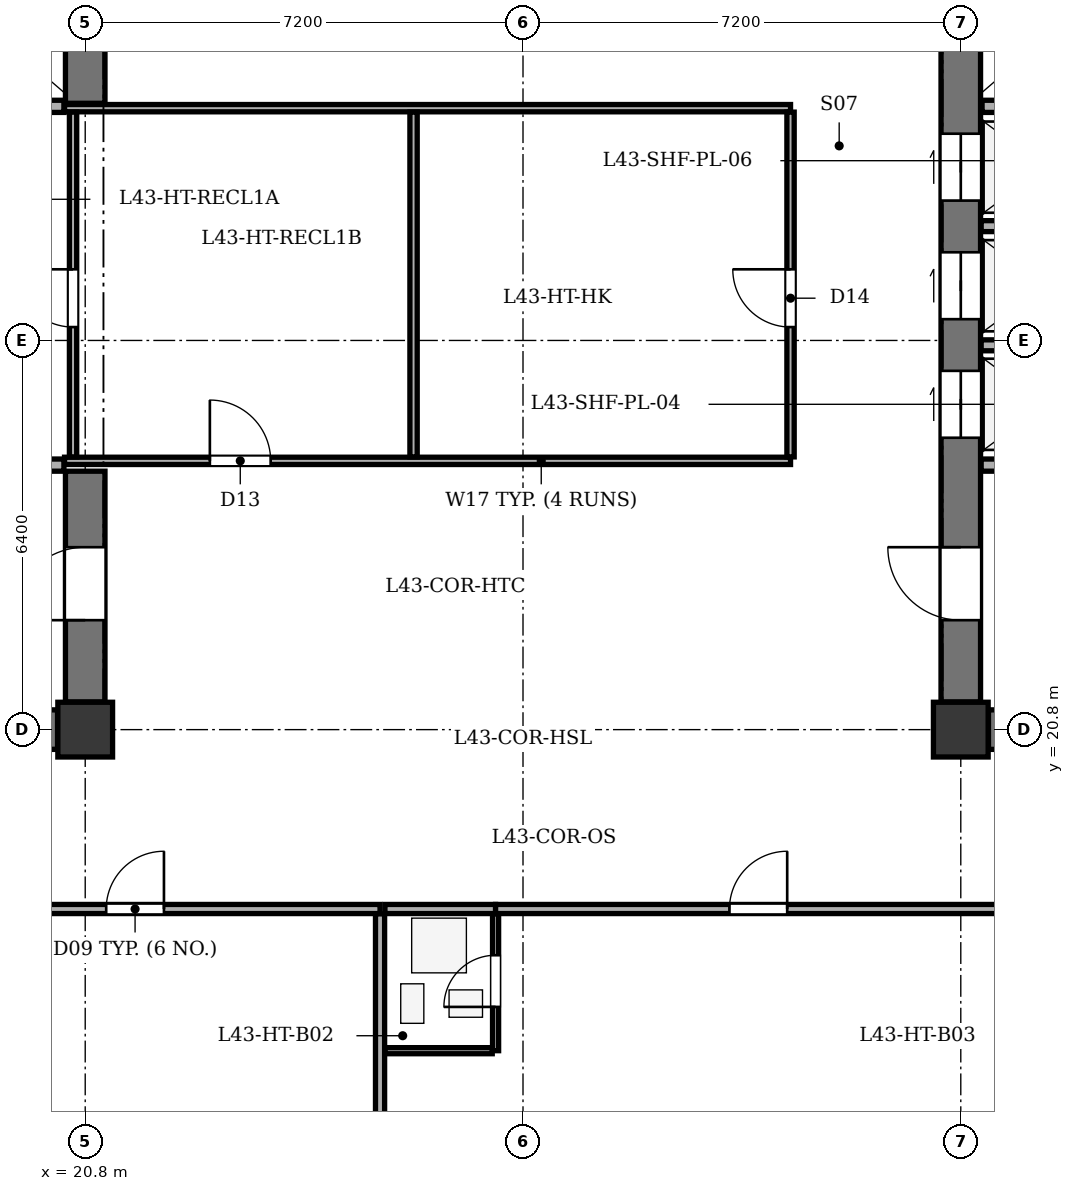
"""IFC4 building model, lengths in metres.
Left out: names, types, materials, properties, quantities, classifications, styles, units other than length and angle.
Written with IfcOpenShell. Run it as: python <this file> out.ifc"""

import sys

from ifc_helpers import new_model, si_unit, direction, frame, frame_2d, origin, origin_2d, place, context, subcontext, project, spatial, rectangle, extrude, element, fill, save


model = new_model("IFC4")
c1 = context("Model", 3, precision=1e-05, world=origin(), true_north=direction((0.0, 1.0)))
c2 = subcontext(c1, "Body", "Model", "MODEL_VIEW")
j1 = project(units=[si_unit("LENGTHUNIT", "METRE"), si_unit("PLANEANGLEUNIT", "RADIAN")], contexts=[c1])
p1 = place(None, origin())
s1 = spatial("IfcSite", under=j1, at=p1, CompositionType="ELEMENT")
p2 = place(p1, origin())
s2 = spatial("IfcBuilding", under=s1, at=p2, CompositionType="ELEMENT")
p3 = place(p2, frame((0.0, 0.0, 169.3)))
s3 = spatial("IfcBuildingStorey", under=s2, at=p3, CompositionType="ELEMENT", Elevation=169.3)
for number, where, z_axis, x_axis in (
    (1, (20.8, 20.8, 0.0), (0.0, 0.0, 1.0), (1.0, 0.0, 0.0)),
    (2, (35.2, 20.8, 0.0), (0.0, 0.0, 1.0), (1.0, 0.0, 0.0)),
):
    element("IfcColumn", number, at=place(p3, frame(where, z_axis=z_axis, x_axis=x_axis)), inside=s3, PredefinedType="COLUMN", context=c2, shape_type="SweptSolid", body=[
        extrude(rectangle(XDim=0.9, YDim=0.9, at=origin_2d()), origin(), (0.0, 0.0, 1.0), 3.5),
    ])
p4 = place(p3, frame((13.255, 20.8, 0.0), z_axis=(0.0, 0.0, 1.0), x_axis=(1.0, 0.0, 0.0)))
e3 = element("IfcWall", 3, at=p4, inside=s3, PredefinedType="SHEAR", context=c2, shape_type="SweptSolid", body=[
    extrude(rectangle(XDim=7.09, YDim=0.65, at=frame_2d((3.545, 0.0))), origin(), (0.0, 0.0, 1.0), 3.2),
])
p5 = place(p3, frame((20.8, 21.255, 0.0), z_axis=(0.0, 0.0, 1.0), x_axis=(0.0, 1.0, 0.0)))
e4 = element("IfcWall", 4, at=p5, inside=s3, PredefinedType="SHEAR", context=c2, shape_type="SweptSolid", body=[
    extrude(rectangle(XDim=3.795, YDim=0.65, at=frame_2d((1.897, 0.0))), origin(), (0.0, 0.0, 1.0), 3.2),
])
p6 = place(p5, frame((1.345, 0.0, 0.0)))
e5 = element("IfcOpeningElement", 5, at=p6, cuts=e4, PredefinedType="OPENING", context=c2, shape_type="SweptSolid", body=[
    extrude(rectangle(XDim=1.2, YDim=2.15, at=frame_2d((0.6, 1.075))), frame((0.0, 0.335, 0.0), z_axis=(0.0, -1.0, 0.0), x_axis=(1.0, 0.0, 0.0)), (0.0, 0.0, 1.0), 0.67),
])
p7 = place(p3, frame((20.8, 31.1, 0.0), z_axis=(0.0, 0.0, 1.0), x_axis=(0.0, 1.0, 0.0)))
e6 = element("IfcWall", 6, at=p7, inside=s3, PredefinedType="SHEAR", context=c2, shape_type="SweptSolid", body=[
    extrude(rectangle(XDim=2.045, YDim=0.65, at=frame_2d((1.022, 0.0))), origin(), (0.0, 0.0, 1.0), 3.2),
])
for number, where, z_axis, x_axis in (
    (7, (16.6, 25.15, 0.0), (0.0, 0.0, 1.0), (1.0, 0.0, 0.0)),
    (8, (16.6, 31.05, 0.0), (0.0, 0.0, 1.0), (1.0, 0.0, 0.0)),
):
    element("IfcWall", number, at=place(p3, frame(where, z_axis=z_axis, x_axis=x_axis)), inside=s3, PredefinedType="SOLIDWALL", context=c2, shape_type="SweptSolid", body=[
        extrude(rectangle(XDim=3.85, YDim=0.2, at=frame_2d((1.925, 0.0))), origin(), (0.0, 0.0, 1.0), 3.2),
    ])
p8 = place(p3, frame((35.655, 20.8, 0.0), z_axis=(0.0, 0.0, 1.0), x_axis=(1.0, 0.0, 0.0)))
e9 = element("IfcWall", 9, at=p8, inside=s3, PredefinedType="SHEAR", context=c2, shape_type="SweptSolid", body=[
    extrude(rectangle(XDim=7.09, YDim=0.65, at=frame_2d((3.545, 0.0))), origin(), (0.0, 0.0, 1.0), 3.2),
])
p9 = place(p3, frame((35.2, 21.255, 0.0), z_axis=(0.0, 0.0, 1.0), x_axis=(0.0, 1.0, 0.0)))
e10 = element("IfcWall", 10, at=p9, inside=s3, PredefinedType="SHEAR", context=c2, shape_type="SweptSolid", body=[
    extrude(rectangle(XDim=11.89, YDim=0.65, at=frame_2d((5.945, 0.0))), origin(), (0.0, 0.0, 1.0), 3.2),
])
p10 = place(p9, frame((1.345, 0.0, 0.0)))
e11 = element("IfcOpeningElement", 11, at=p10, cuts=e10, PredefinedType="OPENING", context=c2, shape_type="SweptSolid", body=[
    extrude(rectangle(XDim=1.2, YDim=2.15, at=frame_2d((0.6, 1.075))), frame((0.0, 0.335, 0.0), z_axis=(0.0, -1.0, 0.0), x_axis=(1.0, 0.0, 0.0)), (0.0, 0.0, 1.0), 0.67),
])
p11 = place(p9, frame((4.345, 0.0, 0.0)))
e12 = element("IfcOpeningElement", 12, at=p11, cuts=e10, PredefinedType="OPENING", context=c2, shape_type="SweptSolid", body=[
    extrude(rectangle(XDim=1.1, YDim=2.1, at=frame_2d((0.55, 1.05))), frame((0.0, 0.335, 0.0), z_axis=(0.0, -1.0, 0.0), x_axis=(1.0, 0.0, 0.0)), (0.0, 0.0, 1.0), 0.67),
])
p12 = place(p9, frame((6.295, 0.0, 0.0)))
e13 = element("IfcOpeningElement", 13, at=p12, cuts=e10, PredefinedType="OPENING", context=c2, shape_type="SweptSolid", body=[
    extrude(rectangle(XDim=1.1, YDim=2.1, at=frame_2d((0.55, 1.05))), frame((0.0, 0.335, 0.0), z_axis=(0.0, -1.0, 0.0), x_axis=(1.0, 0.0, 0.0)), (0.0, 0.0, 1.0), 0.67),
])
p13 = place(p9, frame((8.245, 0.0, 0.0)))
e14 = element("IfcOpeningElement", 14, at=p13, cuts=e10, PredefinedType="OPENING", context=c2, shape_type="SweptSolid", body=[
    extrude(rectangle(XDim=1.1, YDim=2.1, at=frame_2d((0.55, 1.05))), frame((0.0, 0.335, 0.0), z_axis=(0.0, -1.0, 0.0), x_axis=(1.0, 0.0, 0.0)), (0.0, 0.0, 1.0), 0.67),
])
p14 = place(p3, frame((35.535, 25.15, 0.0), z_axis=(0.0, 0.0, 1.0), x_axis=(1.0, 0.0, 0.0)))
e15 = element("IfcWall", 15, at=p14, inside=s3, PredefinedType="SOLIDWALL", context=c2, shape_type="SweptSolid", body=[
    extrude(rectangle(XDim=3.865, YDim=0.2, at=frame_2d((1.933, 0.0))), origin(), (0.0, 0.0, 1.0), 3.2),
])
p15 = place(p3, frame((35.55, 31.05, 0.0), z_axis=(0.0, 0.0, 1.0), x_axis=(1.0, 0.0, 0.0)))
e16 = element("IfcWall", 16, at=p15, inside=s3, PredefinedType="SOLIDWALL", context=c2, shape_type="SweptSolid", body=[
    extrude(rectangle(XDim=2.25, YDim=0.2, at=frame_2d((1.125, 0.0))), origin(), (0.0, 0.0, 1.0), 3.2),
])
for number, where, z_axis, x_axis in (
    (17, (35.535, 27.12, 0.0), (0.0, 0.0, 1.0), (1.0, 0.0, 0.0)),
    (18, (35.535, 29.08, 0.0), (0.0, 0.0, 1.0), (1.0, 0.0, 0.0)),
):
    element("IfcWall", number, at=place(p3, frame(where, z_axis=z_axis, x_axis=x_axis)), inside=s3, PredefinedType="PARTITIONING", context=c2, shape_type="SweptSolid", body=[
        extrude(rectangle(XDim=2.245, YDim=0.18, at=frame_2d((1.123, 0.0))), origin(), (0.0, 0.0, 1.0), 3.2),
    ])
p16 = place(p3, frame((20.46, 25.22, 0.0), z_axis=(0.0, 0.0, 1.0), x_axis=(1.0, 0.0, 0.0)))
e19 = element("IfcWall", 19, at=p16, inside=s3, PredefinedType="PARTITIONING", context=c2, shape_type="SweptSolid", body=[
    extrude(rectangle(XDim=11.94, YDim=0.12, at=frame_2d((5.97, 0.0))), origin(), (0.0, 0.0, 1.0), 3.2),
])
p17 = place(p16, frame((2.39, 0.0, 0.0)))
e20 = element("IfcOpeningElement", 20, at=p17, cuts=e19, PredefinedType="OPENING", context=c2, shape_type="SweptSolid", body=[
    extrude(rectangle(XDim=1.0, YDim=2.1, at=frame_2d((0.5, 1.05))), frame((0.0, 0.07, 0.0), z_axis=(0.0, -1.0, 0.0), x_axis=(1.0, 0.0, 0.0)), (0.0, 0.0, 1.0), 0.14),
])
p18 = place(p3, frame((20.46, 31.02, 0.0), z_axis=(0.0, 0.0, 1.0), x_axis=(1.0, 0.0, 0.0)))
e21 = element("IfcWall", 21, at=p18, inside=s3, PredefinedType="PARTITIONING", context=c2, shape_type="SweptSolid", body=[
    extrude(rectangle(XDim=11.94, YDim=0.12, at=frame_2d((5.97, 0.0))), origin(), (0.0, 0.0, 1.0), 3.2),
])
p19 = place(p3, frame((32.4, 25.285, 0.0), z_axis=(0.0, 0.0, 1.0), x_axis=(0.0, 1.0, 0.0)))
e22 = element("IfcWall", 22, at=p19, inside=s3, PredefinedType="PARTITIONING", context=c2, shape_type="SweptSolid", body=[
    extrude(rectangle(XDim=5.67, YDim=0.12, at=frame_2d((2.835, 0.0))), origin(), (0.0, 0.0, 1.0), 3.2),
])
p20 = place(p19, frame((2.135, 0.0, 0.0)))
e23 = element("IfcOpeningElement", 23, at=p20, cuts=e22, PredefinedType="OPENING", context=c2, shape_type="SweptSolid", body=[
    extrude(rectangle(XDim=0.95, YDim=2.1, at=frame_2d((0.475, 1.05))), frame((0.0, 0.07, 0.0), z_axis=(0.0, -1.0, 0.0), x_axis=(1.0, 0.0, 0.0)), (0.0, 0.0, 1.0), 0.14),
])
p21 = place(p3, frame((20.6, 25.285, 0.0), z_axis=(0.0, 0.0, 1.0), x_axis=(0.0, 1.0, 0.0)))
e24 = element("IfcWall", 24, at=p21, inside=s3, PredefinedType="PARTITIONING", context=c2, shape_type="SweptSolid", body=[
    extrude(rectangle(XDim=5.67, YDim=0.12, at=frame_2d((2.835, 0.0))), origin(), (0.0, 0.0, 1.0), 2.735),
])
p22 = place(p21, frame((2.135, 0.0, 0.0)))
e25 = element("IfcOpeningElement", 25, at=p22, cuts=e24, PredefinedType="OPENING", context=c2, shape_type="SweptSolid", body=[
    extrude(rectangle(XDim=0.95, YDim=2.1, at=frame_2d((0.475, 1.05))), frame((0.0, 0.07, 0.0), z_axis=(0.0, -1.0, 0.0), x_axis=(1.0, 0.0, 0.0)), (0.0, 0.0, 1.0), 0.14),
])
p23 = place(p3, frame((26.2, 25.285, 0.0), z_axis=(0.0, 0.0, 1.0), x_axis=(0.0, 1.0, 0.0)))
e26 = element("IfcWall", 26, at=p23, inside=s3, PredefinedType="PARTITIONING", context=c2, shape_type="SweptSolid", body=[
    extrude(rectangle(XDim=5.67, YDim=0.12, at=frame_2d((2.835, 0.0))), origin(), (0.0, 0.0, 1.0), 3.2),
])
p24 = place(p3, frame((17.6, 17.85, 0.0), z_axis=(0.0, 0.0, 1.0), x_axis=(1.0, 0.0, 0.0)))
e27 = element("IfcWall", 27, at=p24, inside=s3, PredefinedType="PARTITIONING", context=c2, shape_type="SweptSolid", body=[
    extrude(rectangle(XDim=8.049, YDim=0.15, at=frame_2d((4.024, 0.0))), origin(), (0.0, 0.0, 1.0), 3.2),
])
p25 = place(p24, frame((3.545, 0.0, 0.0)))
e28 = element("IfcOpeningElement", 28, at=p25, cuts=e27, PredefinedType="OPENING", context=c2, shape_type="SweptSolid", body=[
    extrude(rectangle(XDim=0.95, YDim=2.1, at=frame_2d((0.475, 1.05))), frame((0.0, 0.085, 0.0), z_axis=(0.0, -1.0, 0.0), x_axis=(1.0, 0.0, 0.0)), (0.0, 0.0, 1.0), 0.17),
])
p26 = place(p3, frame((25.649, 8.275, 0.0), z_axis=(0.0, 0.0, 1.0), x_axis=(0.0, 1.0, 0.0)))
e29 = element("IfcWall", 29, at=p26, inside=s3, PredefinedType="PARTITIONING", context=c2, shape_type="SweptSolid", body=[
    extrude(rectangle(XDim=9.495, YDim=0.15, at=frame_2d((4.748, 0.0))), origin(), (0.0, 0.0, 1.0), 3.2),
])
p27 = place(p3, frame((25.729, 17.85, 0.0), z_axis=(0.0, 0.0, 1.0), x_axis=(1.0, 0.0, 0.0)))
e30 = element("IfcWall", 30, at=p27, inside=s3, PredefinedType="PARTITIONING", context=c2, shape_type="SweptSolid", body=[
    extrude(rectangle(XDim=1.82, YDim=0.15, at=frame_2d((0.91, 0.0))), origin(), (0.0, 0.0, 1.0), 3.2),
])
p28 = place(p3, frame((27.549, 17.85, 0.0), z_axis=(0.0, 0.0, 1.0), x_axis=(1.0, 0.0, 0.0)))
e31 = element("IfcWall", 31, at=p28, inside=s3, PredefinedType="PARTITIONING", context=c2, shape_type="SweptSolid", body=[
    extrude(rectangle(XDim=8.653, YDim=0.15, at=frame_2d((4.326, 0.0))), origin(), (0.0, 0.0, 1.0), 3.2),
])
p29 = place(p28, frame((3.846, 0.0, 0.0)))
e32 = element("IfcOpeningElement", 32, at=p29, cuts=e31, PredefinedType="OPENING", context=c2, shape_type="SweptSolid", body=[
    extrude(rectangle(XDim=0.95, YDim=2.1, at=frame_2d((0.475, 1.05))), frame((0.0, 0.085, 0.0), z_axis=(0.0, -1.0, 0.0), x_axis=(1.0, 0.0, 0.0)), (0.0, 0.0, 1.0), 0.17),
])
p30 = place(p3, frame((27.549, 15.52, 0.0), z_axis=(0.0, 0.0, 1.0), x_axis=(0.0, 1.0, 0.0)))
e33 = element("IfcWall", 33, at=p30, inside=s3, PredefinedType="PARTITIONING", context=c2, shape_type="SweptSolid", body=[
    extrude(rectangle(XDim=2.25, YDim=0.1, at=frame_2d((1.125, 0.0))), origin(), (0.0, 0.0, 1.0), 3.2),
])
p31 = place(p30, frame((0.72, 0.0, 0.0)))
e34 = element("IfcOpeningElement", 34, at=p31, cuts=e33, PredefinedType="OPENING", context=c2, shape_type="SweptSolid", body=[
    extrude(rectangle(XDim=0.85, YDim=2.05, at=frame_2d((0.425, 1.025))), frame((0.0, 0.06, 0.0), z_axis=(0.0, -1.0, 0.0), x_axis=(1.0, 0.0, 0.0)), (0.0, 0.0, 1.0), 0.12),
])
p32 = place(p3, frame((25.729, 15.52, 0.0), z_axis=(0.0, 0.0, 1.0), x_axis=(1.0, 0.0, 0.0)))
e35 = element("IfcWall", 35, at=p32, inside=s3, PredefinedType="PARTITIONING", context=c2, shape_type="SweptSolid", body=[
    extrude(rectangle(XDim=1.765, YDim=0.1, at=frame_2d((0.882, 0.0))), origin(), (0.0, 0.0, 1.0), 3.2),
])
p33 = place(p6, origin())
e36 = element("IfcDoor", 36, at=p33, inside=s3, OperationType="SINGLE_SWING_LEFT", PredefinedType="DOOR", context=c2, shape_type="SweptSolid", body=[
    extrude(rectangle(XDim=1.2, YDim=2.15, at=frame_2d((0.6, 1.075))), frame((0.0, 0.025, 0.0), z_axis=(0.0, -1.0, 0.0), x_axis=(1.0, 0.0, 0.0)), (0.0, 0.0, 1.0), 0.05),
])
fill(e5, e36)
p34 = place(p10, origin())
e37 = element("IfcDoor", 37, at=p34, inside=s3, OperationType="SINGLE_SWING_RIGHT", PredefinedType="DOOR", context=c2, shape_type="SweptSolid", body=[
    extrude(rectangle(XDim=1.2, YDim=2.15, at=frame_2d((0.6, 1.075))), frame((0.0, 0.025, 0.0), z_axis=(0.0, -1.0, 0.0), x_axis=(1.0, 0.0, 0.0)), (0.0, 0.0, 1.0), 0.05),
])
fill(e11, e37)
p35 = place(p11, origin())
e38 = element("IfcDoor", 38, at=p35, inside=s3, OperationType="DOUBLE_DOOR_SLIDING", PredefinedType="DOOR", context=c2, shape_type="SweptSolid", body=[
    extrude(rectangle(XDim=1.1, YDim=2.1, at=frame_2d((0.55, 1.05))), frame((0.0, 0.025, 0.0), z_axis=(0.0, -1.0, 0.0), x_axis=(1.0, 0.0, 0.0)), (0.0, 0.0, 1.0), 0.05),
])
fill(e12, e38)
p36 = place(p12, origin())
e39 = element("IfcDoor", 39, at=p36, inside=s3, OperationType="DOUBLE_DOOR_SLIDING", PredefinedType="DOOR", context=c2, shape_type="SweptSolid", body=[
    extrude(rectangle(XDim=1.1, YDim=2.1, at=frame_2d((0.55, 1.05))), frame((0.0, 0.025, 0.0), z_axis=(0.0, -1.0, 0.0), x_axis=(1.0, 0.0, 0.0)), (0.0, 0.0, 1.0), 0.05),
])
fill(e13, e39)
p37 = place(p13, origin())
e40 = element("IfcDoor", 40, at=p37, inside=s3, OperationType="DOUBLE_DOOR_SLIDING", PredefinedType="DOOR", context=c2, shape_type="SweptSolid", body=[
    extrude(rectangle(XDim=1.1, YDim=2.1, at=frame_2d((0.55, 1.05))), frame((0.0, 0.025, 0.0), z_axis=(0.0, -1.0, 0.0), x_axis=(1.0, 0.0, 0.0)), (0.0, 0.0, 1.0), 0.05),
])
fill(e14, e40)
p38 = place(p22, origin())
e41 = element("IfcDoor", 41, at=p38, inside=s3, OperationType="SINGLE_SWING_RIGHT", PredefinedType="DOOR", context=c2, shape_type="SweptSolid", body=[
    extrude(rectangle(XDim=0.95, YDim=2.1, at=frame_2d((0.475, 1.05))), frame((0.0, 0.025, 0.0), z_axis=(0.0, -1.0, 0.0), x_axis=(1.0, 0.0, 0.0)), (0.0, 0.0, 1.0), 0.05),
])
fill(e25, e41)
p39 = place(p17, origin())
e42 = element("IfcDoor", 42, at=p39, inside=s3, OperationType="SINGLE_SWING_LEFT", PredefinedType="DOOR", context=c2, shape_type="SweptSolid", body=[
    extrude(rectangle(XDim=1.0, YDim=2.1, at=frame_2d((0.5, 1.05))), frame((0.0, 0.025, 0.0), z_axis=(0.0, -1.0, 0.0), x_axis=(1.0, 0.0, 0.0)), (0.0, 0.0, 1.0), 0.05),
])
fill(e20, e42)
p40 = place(p20, origin())
e43 = element("IfcDoor", 43, at=p40, inside=s3, OperationType="SINGLE_SWING_RIGHT", PredefinedType="DOOR", context=c2, shape_type="SweptSolid", body=[
    extrude(rectangle(XDim=0.95, YDim=2.1, at=frame_2d((0.475, 1.05))), frame((0.0, 0.025, 0.0), z_axis=(0.0, -1.0, 0.0), x_axis=(1.0, 0.0, 0.0)), (0.0, 0.0, 1.0), 0.05),
])
fill(e23, e43)
p41 = place(p25, origin())
e44 = element("IfcDoor", 44, at=p41, inside=s3, OperationType="SINGLE_SWING_RIGHT", PredefinedType="DOOR", context=c2, shape_type="SweptSolid", body=[
    extrude(rectangle(XDim=0.95, YDim=2.1, at=frame_2d((0.475, 1.05))), frame((0.0, 0.025, 0.0), z_axis=(0.0, -1.0, 0.0), x_axis=(1.0, 0.0, 0.0)), (0.0, 0.0, 1.0), 0.05),
])
fill(e28, e44)
p42 = place(p31, origin())
e45 = element("IfcDoor", 45, at=p42, inside=s3, OperationType="SINGLE_SWING_LEFT", PredefinedType="DOOR", context=c2, shape_type="SweptSolid", body=[
    extrude(rectangle(XDim=0.85, YDim=2.05, at=frame_2d((0.425, 1.025))), frame((0.0, 0.025, 0.0), z_axis=(0.0, -1.0, 0.0), x_axis=(1.0, 0.0, 0.0)), (0.0, 0.0, 1.0), 0.05),
])
fill(e34, e45)
p43 = place(p29, origin())
e46 = element("IfcDoor", 46, at=p43, inside=s3, OperationType="SINGLE_SWING_RIGHT", PredefinedType="DOOR", context=c2, shape_type="SweptSolid", body=[
    extrude(rectangle(XDim=0.95, YDim=2.1, at=frame_2d((0.475, 1.05))), frame((0.0, 0.025, 0.0), z_axis=(0.0, -1.0, 0.0), x_axis=(1.0, 0.0, 0.0)), (0.0, 0.0, 1.0), 0.05),
])
fill(e32, e46)
save(model, sys.argv[1])
